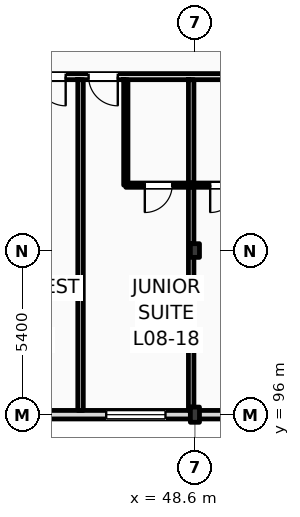
"""IFC4 building model, lengths in metres.
Left out: names, types, materials, properties, quantities, classifications, styles, units other than length and angle.
Written with IfcOpenShell. Run it as: python <this file> out.ifc"""

import sys

from ifc_helpers import new_model, si_unit, direction, frame, frame_2d, origin, origin_2d, place, context, subcontext, project, spatial, rectangle, i_section, extrude, element, fill, save


model = new_model("IFC4")
c1 = context("Model", 3, precision=1e-05, world=origin(), true_north=direction((0.0, 1.0)))
c2 = subcontext(c1, "Body", "Model", "MODEL_VIEW")
j1 = project(units=[si_unit("LENGTHUNIT", "METRE"), si_unit("PLANEANGLEUNIT", "RADIAN")], contexts=[c1])
p1 = place(None, origin())
s1 = spatial("IfcSite", under=j1, at=p1, CompositionType="ELEMENT")
p2 = place(p1, origin())
s2 = spatial("IfcBuilding", under=s1, at=p2, CompositionType="ELEMENT")
p3 = place(p2, frame((0.0, 0.0, 35.4)))
s3 = spatial("IfcBuildingStorey", under=s2, at=p3, CompositionType="ELEMENT", Elevation=35.4)
p4 = place(p3, frame((48.6, 96.0, 0.0), z_axis=(0.0, 0.0, 1.0), x_axis=(1.0, 0.0, 0.0)))
e1 = element("IfcColumn", 1, at=p4, inside=s3, PredefinedType="COLUMN", context=c2, shape_type="SweptSolid", body=[
    extrude(i_section(OverallWidth=0.3, OverallDepth=0.5, WebThickness=0.014, FlangeThickness=0.028, FilletRadius=0.027, at=origin_2d()), origin(), (0.0, 0.0, 1.0), 3.6),
])
p5 = place(p3, frame((48.6, 101.4, 0.0), z_axis=(0.0, 0.0, 1.0), x_axis=(1.0, 0.0, 0.0)))
e2 = element("IfcColumn", 2, at=p5, inside=s3, PredefinedType="COLUMN", context=c2, shape_type="SweptSolid", body=[
    extrude(i_section(OverallWidth=0.3, OverallDepth=0.45, WebThickness=0.014, FlangeThickness=0.026, FilletRadius=0.027, at=origin_2d()), origin(), (0.0, 0.0, 1.0), 3.6),
])
p6 = place(p3, frame((25.2, 96.0, 0.0), z_axis=(0.0, 0.0, 1.0), x_axis=(1.0, 0.0, 0.0)))
e3 = element("IfcWall", 3, at=p6, inside=s3, PredefinedType="STANDARD", context=c2, shape_type="SweptSolid", body=[
    extrude(rectangle(XDim=70.2, YDim=0.28, at=frame_2d((35.1, 0.0))), origin(), (0.0, 0.0, 1.0), 2.92),
])
p7 = place(p6, frame((16.694, 0.0, 0.9)))
e4 = element("IfcOpeningElement", 4, at=p7, cuts=e3, PredefinedType="OPENING", context=c2, shape_type="SweptSolid", body=[
    extrude(rectangle(XDim=1.8, YDim=1.84, at=frame_2d((0.9, 0.92))), frame((0.0, 0.15, 0.0), z_axis=(0.0, -1.0, 0.0), x_axis=(1.0, 0.0, 0.0)), (0.0, 0.0, 1.0), 0.3),
])
p8 = place(p6, frame((20.482, 0.0, 0.9)))
e5 = element("IfcOpeningElement", 5, at=p8, cuts=e3, PredefinedType="OPENING", context=c2, shape_type="SweptSolid", body=[
    extrude(rectangle(XDim=1.95, YDim=1.84, at=frame_2d((0.975, 0.92))), frame((0.0, 0.15, 0.0), z_axis=(0.0, -1.0, 0.0), x_axis=(1.0, 0.0, 0.0)), (0.0, 0.0, 1.0), 0.3),
])
p9 = place(p6, frame((24.316, 0.0, 0.9)))
e6 = element("IfcOpeningElement", 6, at=p9, cuts=e3, PredefinedType="OPENING", context=c2, shape_type="SweptSolid", body=[
    extrude(rectangle(XDim=2.1, YDim=1.84, at=frame_2d((1.05, 0.92))), frame((0.0, 0.15, 0.0), z_axis=(0.0, -1.0, 0.0), x_axis=(1.0, 0.0, 0.0)), (0.0, 0.0, 1.0), 0.3),
])
p10 = place(p6, frame((28.149, 0.0, 0.9)))
e7 = element("IfcOpeningElement", 7, at=p10, cuts=e3, PredefinedType="OPENING", context=c2, shape_type="SweptSolid", body=[
    extrude(rectangle(XDim=2.25, YDim=1.84, at=frame_2d((1.125, 0.92))), frame((0.0, 0.15, 0.0), z_axis=(0.0, -1.0, 0.0), x_axis=(1.0, 0.0, 0.0)), (0.0, 0.0, 1.0), 0.3),
])
p11 = place(p6, frame((31.983, 0.0, 0.9)))
e8 = element("IfcOpeningElement", 8, at=p11, cuts=e3, PredefinedType="OPENING", context=c2, shape_type="SweptSolid", body=[
    extrude(rectangle(XDim=2.4, YDim=1.84, at=frame_2d((1.2, 0.92))), frame((0.0, 0.15, 0.0), z_axis=(0.0, -1.0, 0.0), x_axis=(1.0, 0.0, 0.0)), (0.0, 0.0, 1.0), 0.3),
])
p12 = place(p6, frame((35.682, 0.0, 0.9)))
e9 = element("IfcOpeningElement", 9, at=p12, cuts=e3, PredefinedType="OPENING", context=c2, shape_type="SweptSolid", body=[
    extrude(rectangle(XDim=2.508, YDim=1.84, at=frame_2d((1.254, 0.92))), frame((0.0, 0.15, 0.0), z_axis=(0.0, -1.0, 0.0), x_axis=(1.0, 0.0, 0.0)), (0.0, 0.0, 1.0), 0.3),
])
p13 = place(p6, frame((55.56, 0.0, 0.9)))
e10 = element("IfcOpeningElement", 10, at=p13, cuts=e3, PredefinedType="OPENING", context=c2, shape_type="SweptSolid", body=[
    extrude(rectangle(XDim=1.8, YDim=1.84, at=frame_2d((0.9, 0.92))), frame((0.0, 0.15, 0.0), z_axis=(0.0, -1.0, 0.0), x_axis=(1.0, 0.0, 0.0)), (0.0, 0.0, 1.0), 0.3),
])
p14 = place(p6, frame((58.628, 0.0, 0.9)))
e11 = element("IfcOpeningElement", 11, at=p14, cuts=e3, PredefinedType="OPENING", context=c2, shape_type="SweptSolid", body=[
    extrude(rectangle(XDim=2.809, YDim=1.84, at=frame_2d((1.405, 0.92))), frame((0.0, 0.15, 0.0), z_axis=(0.0, -1.0, 0.0), x_axis=(1.0, 0.0, 0.0)), (0.0, 0.0, 1.0), 0.3),
])
p15 = place(p6, frame((63.257, 0.0, 0.9)))
e12 = element("IfcOpeningElement", 12, at=p15, cuts=e3, PredefinedType="OPENING", context=c2, shape_type="SweptSolid", body=[
    extrude(rectangle(XDim=1.8, YDim=1.84, at=frame_2d((0.9, 0.92))), frame((0.0, 0.15, 0.0), z_axis=(0.0, -1.0, 0.0), x_axis=(1.0, 0.0, 0.0)), (0.0, 0.0, 1.0), 0.3),
])
p16 = place(p6, frame((66.453, 0.0, 0.9)))
e13 = element("IfcOpeningElement", 13, at=p16, cuts=e3, PredefinedType="OPENING", context=c2, shape_type="SweptSolid", body=[
    extrude(rectangle(XDim=2.737, YDim=1.84, at=frame_2d((1.369, 0.92))), frame((0.0, 0.15, 0.0), z_axis=(0.0, -1.0, 0.0), x_axis=(1.0, 0.0, 0.0)), (0.0, 0.0, 1.0), 0.3),
])
p17 = place(p3, frame((40.76, 107.12, 0.0), z_axis=(0.0, 0.0, 1.0), x_axis=(1.0, 0.0, 0.0)))
e14 = element("IfcWall", 14, at=p17, inside=s3, PredefinedType="PARTITIONING", context=c2, shape_type="SweptSolid", body=[
    extrude(rectangle(XDim=23.44, YDim=0.2, at=frame_2d((11.72, 0.0))), origin(), (0.0, 0.0, 1.0), 3.38),
])
p18 = place(p17, frame((2.629, 0.0, 0.0)))
e15 = element("IfcOpeningElement", 15, at=p18, cuts=e14, PredefinedType="OPENING", context=c2, shape_type="SweptSolid", body=[
    extrude(rectangle(XDim=0.96, YDim=2.2, at=frame_2d((0.48, 1.1))), frame((0.0, 0.11, 0.0), z_axis=(0.0, -1.0, 0.0), x_axis=(1.0, 0.0, 0.0)), (0.0, 0.0, 1.0), 0.22),
])
p19 = place(p17, frame((4.343, 0.0, 0.0)))
e16 = element("IfcOpeningElement", 16, at=p19, cuts=e14, PredefinedType="OPENING", context=c2, shape_type="SweptSolid", body=[
    extrude(rectangle(XDim=0.96, YDim=2.2, at=frame_2d((0.48, 1.1))), frame((0.0, 0.11, 0.0), z_axis=(0.0, -1.0, 0.0), x_axis=(1.0, 0.0, 0.0)), (0.0, 0.0, 1.0), 0.22),
])
p20 = place(p17, frame((10.401, 0.0, 0.0)))
e17 = element("IfcOpeningElement", 17, at=p20, cuts=e14, PredefinedType="OPENING", context=c2, shape_type="SweptSolid", body=[
    extrude(rectangle(XDim=0.96, YDim=2.2, at=frame_2d((0.48, 1.1))), frame((0.0, 0.11, 0.0), z_axis=(0.0, -1.0, 0.0), x_axis=(1.0, 0.0, 0.0)), (0.0, 0.0, 1.0), 0.22),
])
p21 = place(p17, frame((12.159, 0.0, 0.0)))
e18 = element("IfcOpeningElement", 18, at=p21, cuts=e14, PredefinedType="OPENING", context=c2, shape_type="SweptSolid", body=[
    extrude(rectangle(XDim=0.96, YDim=2.2, at=frame_2d((0.48, 1.1))), frame((0.0, 0.11, 0.0), z_axis=(0.0, -1.0, 0.0), x_axis=(1.0, 0.0, 0.0)), (0.0, 0.0, 1.0), 0.22),
])
p22 = place(p17, frame((18.218, 0.0, 0.0)))
e19 = element("IfcOpeningElement", 19, at=p22, cuts=e14, PredefinedType="OPENING", context=c2, shape_type="SweptSolid", body=[
    extrude(rectangle(XDim=0.96, YDim=2.2, at=frame_2d((0.48, 1.1))), frame((0.0, 0.11, 0.0), z_axis=(0.0, -1.0, 0.0), x_axis=(1.0, 0.0, 0.0)), (0.0, 0.0, 1.0), 0.22),
])
p23 = place(p17, frame((20.021, 0.0, 0.0)))
e20 = element("IfcOpeningElement", 20, at=p23, cuts=e14, PredefinedType="OPENING", context=c2, shape_type="SweptSolid", body=[
    extrude(rectangle(XDim=0.96, YDim=2.2, at=frame_2d((0.48, 1.1))), frame((0.0, 0.11, 0.0), z_axis=(0.0, -1.0, 0.0), x_axis=(1.0, 0.0, 0.0)), (0.0, 0.0, 1.0), 0.22),
])
p24 = place(p3, frame((44.838, 96.14, 0.0), z_axis=(0.0, 0.0, 1.0), x_axis=(0.0, 1.0, 0.0)))
e21 = element("IfcWall", 21, at=p24, inside=s3, PredefinedType="PARTITIONING", context=c2, shape_type="SweptSolid", body=[
    extrude(rectangle(XDim=10.88, YDim=0.18, at=frame_2d((5.44, 0.0))), origin(), (0.0, 0.0, 1.0), 3.38),
])
p25 = place(p3, frame((48.477, 96.14, 0.0), z_axis=(0.0, 0.0, 1.0), x_axis=(0.0, 1.0, 0.0)))
e22 = element("IfcWall", 22, at=p25, inside=s3, PredefinedType="PARTITIONING", context=c2, shape_type="SweptSolid", body=[
    extrude(rectangle(XDim=10.88, YDim=0.18, at=frame_2d((5.44, 0.0))), origin(), (0.0, 0.0, 1.0), 3.01),
])
p26 = place(p3, frame((46.327, 103.55, 0.0), z_axis=(0.0, 0.0, 1.0), x_axis=(0.0, 1.0, 0.0)))
e23 = element("IfcWall", 23, at=p26, inside=s3, PredefinedType="PARTITIONING", context=c2, shape_type="SweptSolid", body=[
    extrude(rectangle(XDim=3.47, YDim=0.14, at=frame_2d((1.735, 0.0))), origin(), (0.0, 0.0, 1.0), 3.38),
])
p27 = place(p3, frame((46.327, 103.55, 0.0), z_axis=(0.0, 0.0, 1.0), x_axis=(1.0, 0.0, 0.0)))
e24 = element("IfcWall", 24, at=p27, inside=s3, PredefinedType="PARTITIONING", context=c2, shape_type="SweptSolid", body=[
    extrude(rectangle(XDim=2.15, YDim=0.14, at=frame_2d((1.075, 0.0))), origin(), (0.0, 0.0, 1.0), 3.38),
])
p28 = place(p27, frame((0.625, 0.0, 0.0)))
e25 = element("IfcOpeningElement", 25, at=p28, cuts=e24, PredefinedType="OPENING", context=c2, shape_type="SweptSolid", body=[
    extrude(rectangle(XDim=0.9, YDim=2.1, at=frame_2d((0.45, 1.05))), frame((0.0, 0.08, 0.0), z_axis=(0.0, -1.0, 0.0), x_axis=(1.0, 0.0, 0.0)), (0.0, 0.0, 1.0), 0.16),
])
p29 = place(p3, frame((48.477, 103.55, 0.0), z_axis=(0.0, 0.0, 1.0), x_axis=(1.0, 0.0, 0.0)))
e26 = element("IfcWall", 26, at=p29, inside=s3, PredefinedType="PARTITIONING", context=c2, shape_type="SweptSolid", body=[
    extrude(rectangle(XDim=2.15, YDim=0.14, at=frame_2d((1.075, 0.0))), origin(), (0.0, 0.0, 1.0), 3.38),
])
p30 = place(p29, frame((0.625, 0.0, 0.0)))
e27 = element("IfcOpeningElement", 27, at=p30, cuts=e26, PredefinedType="OPENING", context=c2, shape_type="SweptSolid", body=[
    extrude(rectangle(XDim=0.9, YDim=2.1, at=frame_2d((0.45, 1.05))), frame((0.0, 0.08, 0.0), z_axis=(0.0, -1.0, 0.0), x_axis=(1.0, 0.0, 0.0)), (0.0, 0.0, 1.0), 0.16),
])
p31 = place(p8, origin())
e28 = element("IfcWindow", 28, at=p31, inside=s3, PartitioningType="DOUBLE_PANEL_VERTICAL", PredefinedType="WINDOW", context=c2, shape_type="SweptSolid", body=[
    extrude(rectangle(XDim=1.95, YDim=1.84, at=frame_2d((0.975, 0.92))), frame((0.0, 0.03, 0.0), z_axis=(0.0, -1.0, 0.0), x_axis=(1.0, 0.0, 0.0)), (0.0, 0.0, 1.0), 0.06),
])
fill(e5, e28)
p32 = place(p18, frame((0.96, 0.0, 0.0), z_axis=(0.0, 0.0, 1.0), x_axis=(-1.0, 0.0, 0.0)))
e29 = element("IfcDoor", 29, at=p32, inside=s3, OperationType="SINGLE_SWING_RIGHT", PredefinedType="DOOR", context=c2, shape_type="SweptSolid", body=[
    extrude(rectangle(XDim=0.96, YDim=2.2, at=frame_2d((0.48, 1.1))), frame((0.0, 0.025, 0.0), z_axis=(0.0, -1.0, 0.0), x_axis=(1.0, 0.0, 0.0)), (0.0, 0.0, 1.0), 0.05),
])
fill(e15, e29)
p33 = place(p19, frame((0.96, 0.0, 0.0), z_axis=(0.0, 0.0, 1.0), x_axis=(-1.0, 0.0, 0.0)))
e30 = element("IfcDoor", 30, at=p33, inside=s3, OperationType="SINGLE_SWING_RIGHT", PredefinedType="DOOR", context=c2, shape_type="SweptSolid", body=[
    extrude(rectangle(XDim=0.96, YDim=2.2, at=frame_2d((0.48, 1.1))), frame((0.0, 0.025, 0.0), z_axis=(0.0, -1.0, 0.0), x_axis=(1.0, 0.0, 0.0)), (0.0, 0.0, 1.0), 0.05),
])
fill(e16, e30)
p34 = place(p28, frame((0.9, 0.0, 0.0), z_axis=(0.0, 0.0, 1.0), x_axis=(-1.0, 0.0, 0.0)))
e31 = element("IfcDoor", 31, at=p34, inside=s3, OperationType="SINGLE_SWING_LEFT", PredefinedType="DOOR", context=c2, shape_type="SweptSolid", body=[
    extrude(rectangle(XDim=0.9, YDim=2.1, at=frame_2d((0.45, 1.05))), frame((0.0, 0.025, 0.0), z_axis=(0.0, -1.0, 0.0), x_axis=(1.0, 0.0, 0.0)), (0.0, 0.0, 1.0), 0.05),
])
fill(e25, e31)
p35 = place(p30, frame((0.9, 0.0, 0.0), z_axis=(0.0, 0.0, 1.0), x_axis=(-1.0, 0.0, 0.0)))
e32 = element("IfcDoor", 32, at=p35, inside=s3, OperationType="SINGLE_SWING_LEFT", PredefinedType="DOOR", context=c2, shape_type="SweptSolid", body=[
    extrude(rectangle(XDim=0.9, YDim=2.1, at=frame_2d((0.45, 1.05))), frame((0.0, 0.025, 0.0), z_axis=(0.0, -1.0, 0.0), x_axis=(1.0, 0.0, 0.0)), (0.0, 0.0, 1.0), 0.05),
])
fill(e27, e32)
save(model, sys.argv[1])
